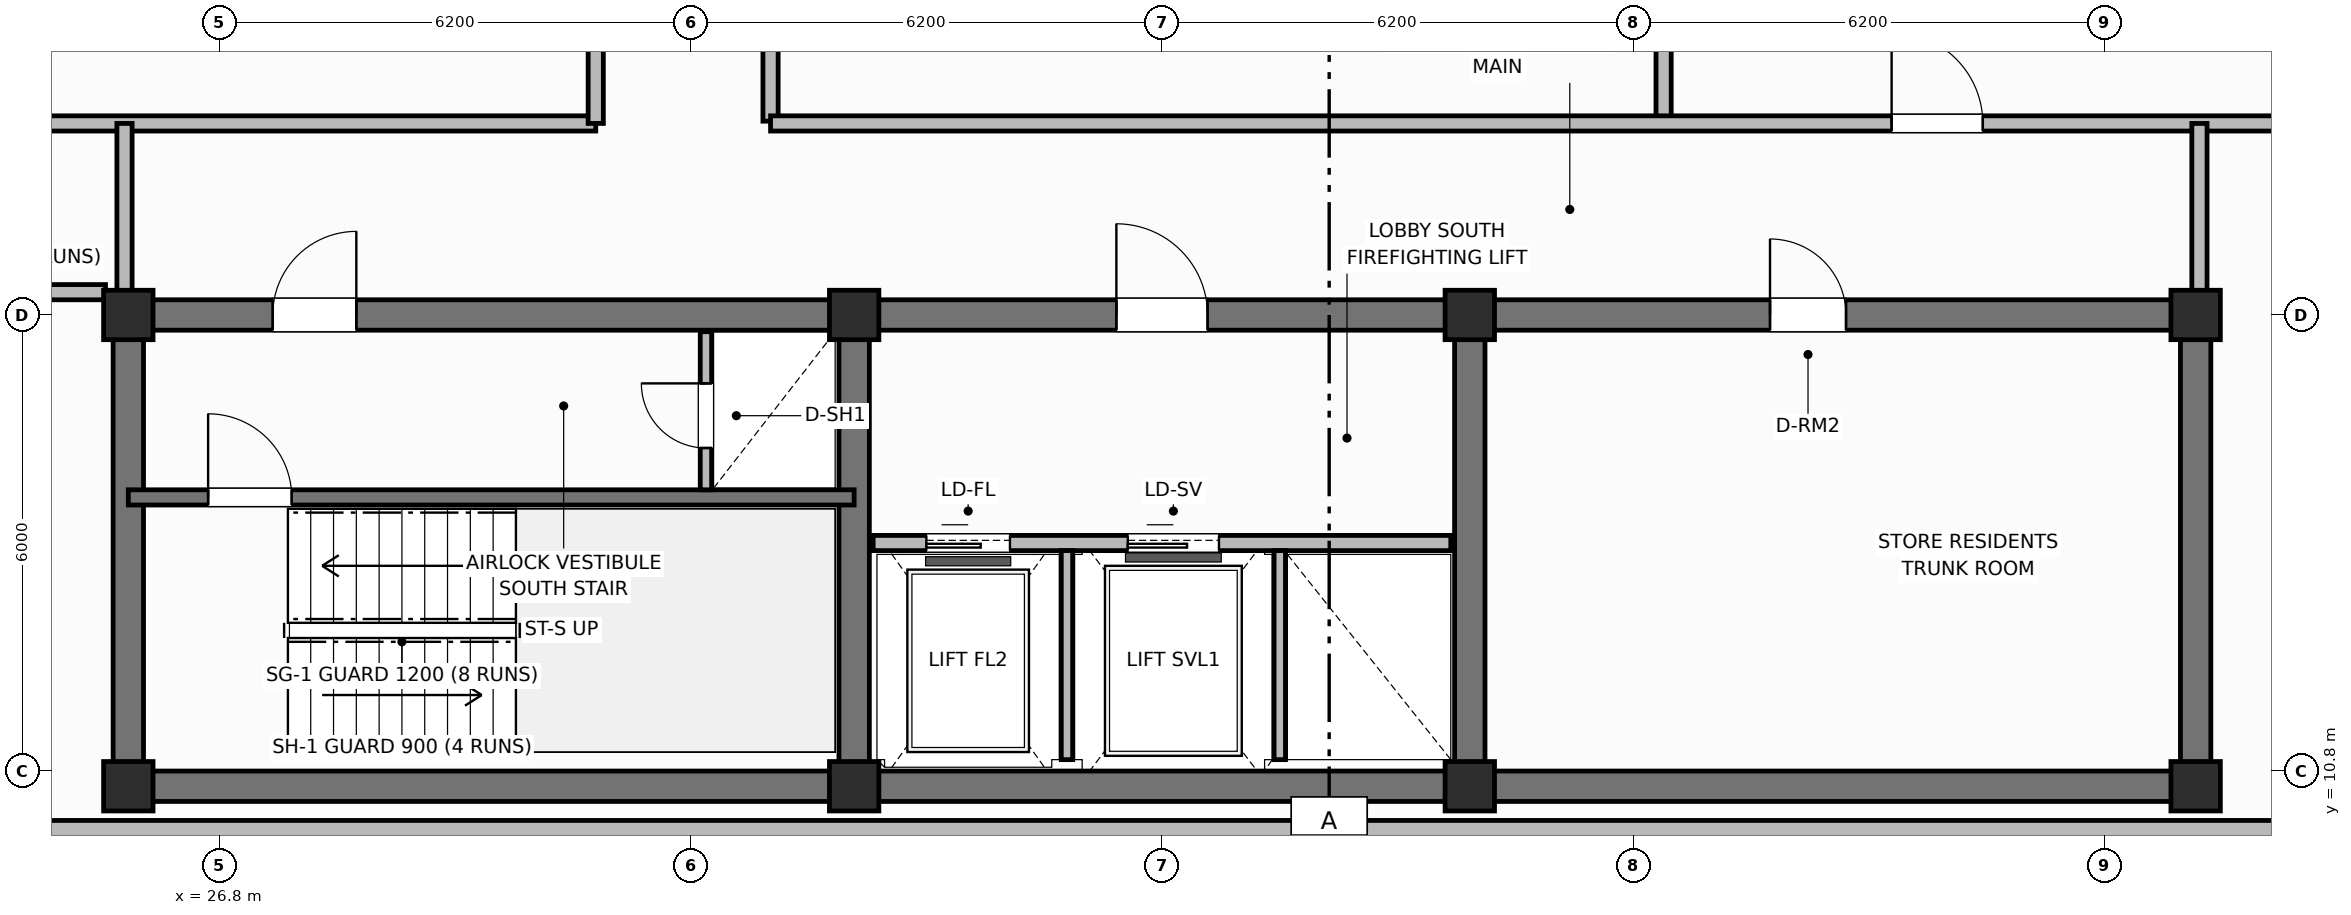
"""IFC4 building model, lengths in metres.
Left out: names, types, materials, properties, quantities, classifications, styles, units other than length and angle.
Written with IfcOpenShell. Run it as: python <this file> out.ifc"""

import sys

from ifc_helpers import new_model, si_unit, direction, frame, frame_2d, origin, origin_2d, place, context, subcontext, project, spatial, rectangle, extrude, element, fill, save


model = new_model("IFC4")
c1 = context("Model", 3, precision=1e-05, world=origin(), true_north=direction((0.0, 1.0)))
c2 = subcontext(c1, "Body", "Model", "MODEL_VIEW")
j1 = project(units=[si_unit("LENGTHUNIT", "METRE"), si_unit("PLANEANGLEUNIT", "RADIAN")], contexts=[c1])
p1 = place(None, origin())
s1 = spatial("IfcSite", under=j1, at=p1, CompositionType="ELEMENT")
p2 = place(p1, origin())
s2 = spatial("IfcBuilding", under=s1, at=p2, CompositionType="ELEMENT")
p3 = place(p2, frame((0.0, 0.0, 316.4)))
s3 = spatial("IfcBuildingStorey", under=s2, at=p3, CompositionType="ELEMENT", Elevation=316.4)
p4 = place(p3, frame((52.8, 10.6, 0.0), z_axis=(0.0, 0.0, 1.0), x_axis=(-1.0, 0.0, 0.0)))
e1 = element("IfcWall", 1, at=p4, inside=s3, PredefinedType="SHEAR", context=c2, shape_type="SweptSolid", body=[
    extrude(rectangle(XDim=27.2, YDim=0.4, at=frame_2d((13.6, 0.0))), origin(), (0.0, 0.0, 1.0), 3.6),
])
for number, where, z_axis, x_axis in (
    (2, (25.6, 10.8, 0.0), (0.0, 0.0, 1.0), (0.0, 1.0, 0.0)),
    (3, (52.8, 10.8, 0.0), (0.0, 0.0, 1.0), (0.0, 1.0, 0.0)),
):
    element("IfcWall", number, at=place(p3, frame(where, z_axis=z_axis, x_axis=x_axis)), inside=s3, PredefinedType="SHEAR", context=c2, shape_type="SweptSolid", body=[
        extrude(rectangle(XDim=5.8, YDim=0.4, at=frame_2d((2.9, 0.0))), origin(), (0.0, 0.0, 1.0), 3.6),
    ])
p5 = place(p3, frame((25.6, 16.8, 0.0), z_axis=(0.0, 0.0, 1.0), x_axis=(1.0, 0.0, 0.0)))
e4 = element("IfcWall", 4, at=p5, inside=s3, PredefinedType="SHEAR", context=c2, shape_type="SweptSolid", body=[
    extrude(rectangle(XDim=27.2, YDim=0.4, at=frame_2d((13.6, 0.0))), origin(), (0.0, 0.0, 1.0), 3.6),
])
p6 = place(p5, frame((1.9, 0.0, 0.0)))
e5 = element("IfcOpeningElement", 5, at=p6, cuts=e4, PredefinedType="OPENING", context=c2, shape_type="SweptSolid", body=[
    extrude(rectangle(XDim=1.1, YDim=2.15, at=frame_2d((0.55, 1.075))), frame((0.0, 0.21, 0.0), z_axis=(0.0, -1.0, 0.0), x_axis=(1.0, 0.0, 0.0)), (0.0, 0.0, 1.0), 0.42),
])
p7 = place(p5, frame((13.0, 0.0, 0.0)))
e6 = element("IfcOpeningElement", 6, at=p7, cuts=e4, PredefinedType="OPENING", context=c2, shape_type="SweptSolid", body=[
    extrude(rectangle(XDim=1.2, YDim=2.15, at=frame_2d((0.6, 1.075))), frame((0.0, 0.21, 0.0), z_axis=(0.0, -1.0, 0.0), x_axis=(1.0, 0.0, 0.0)), (0.0, 0.0, 1.0), 0.42),
])
p8 = place(p5, frame((21.6, 0.0, 0.0)))
e7 = element("IfcOpeningElement", 7, at=p8, cuts=e4, PredefinedType="OPENING", context=c2, shape_type="SweptSolid", body=[
    extrude(rectangle(XDim=1.0, YDim=2.15, at=frame_2d((0.5, 1.075))), frame((0.0, 0.21, 0.0), z_axis=(0.0, -1.0, 0.0), x_axis=(1.0, 0.0, 0.0)), (0.0, 0.0, 1.0), 0.42),
])
for number, where, z_axis, x_axis in (
    (8, (35.15, 10.8, 0.0), (0.0, 0.0, 1.0), (0.0, 1.0, 0.0)),
    (9, (43.25, 10.8, 0.0), (0.0, 0.0, 1.0), (0.0, 1.0, 0.0)),
):
    element("IfcWall", number, at=place(p3, frame(where, z_axis=z_axis, x_axis=x_axis)), inside=s3, PredefinedType="SHEAR", context=c2, shape_type="SweptSolid", body=[
        extrude(rectangle(XDim=5.8, YDim=0.4, at=frame_2d((2.9, 0.0))), origin(), (0.0, 0.0, 1.0), 3.6),
    ])
for number, where, z_axis, x_axis in (
    (10, (25.6, 10.6, 0.0), (0.0, 0.0, 1.0), (1.0, 0.0, 0.0)),
    (11, (25.6, 16.8, 0.0), (0.0, 0.0, 1.0), (1.0, 0.0, 0.0)),
    (12, (35.15, 10.6, 0.0), (0.0, 0.0, 1.0), (1.0, 0.0, 0.0)),
    (13, (35.15, 16.8, 0.0), (0.0, 0.0, 1.0), (1.0, 0.0, 0.0)),
    (14, (43.25, 10.6, 0.0), (0.0, 0.0, 1.0), (1.0, 0.0, 0.0)),
    (15, (43.25, 16.8, 0.0), (0.0, 0.0, 1.0), (1.0, 0.0, 0.0)),
    (16, (52.8, 10.6, 0.0), (0.0, 0.0, 1.0), (1.0, 0.0, 0.0)),
    (17, (52.8, 16.8, 0.0), (0.0, 0.0, 1.0), (1.0, 0.0, 0.0)),
):
    element("IfcColumn", number, at=place(p3, frame(where, z_axis=z_axis, x_axis=x_axis)), inside=s3, PredefinedType="COLUMN", context=c2, shape_type="SweptSolid", body=[
        extrude(rectangle(XDim=0.65, YDim=0.65, at=origin_2d()), origin(), (0.0, 0.0, 1.0), 3.6),
    ])
p9 = place(p3, frame((23.76, 10.0, 0.0), z_axis=(0.0, 0.0, 1.0), x_axis=(1.0, 0.0, 0.0)))
e18 = element("IfcWall", 18, at=p9, inside=s3, PredefinedType="SOLIDWALL", context=c2, shape_type="SweptSolid", body=[
    extrude(rectangle(XDim=30.88, YDim=0.3, at=frame_2d((15.44, 0.0))), origin(), (0.0, 0.0, 1.0), 2.84),
])
p10 = place(p3, frame((25.6, 14.4, 0.0), z_axis=(0.0, 0.0, 1.0), x_axis=(1.0, 0.0, 0.0)))
e19 = element("IfcWall", 19, at=p10, inside=s3, PredefinedType="SHEAR", context=c2, shape_type="SweptSolid", body=[
    extrude(rectangle(XDim=9.55, YDim=0.2, at=frame_2d((4.775, 0.0))), origin(), (0.0, 0.0, 1.0), 3.6),
])
p11 = place(p10, frame((1.05, 0.0, 0.0)))
e20 = element("IfcOpeningElement", 20, at=p11, cuts=e19, PredefinedType="OPENING", context=c2, shape_type="SweptSolid", body=[
    extrude(rectangle(XDim=1.1, YDim=2.15, at=frame_2d((0.55, 1.075))), frame((0.0, 0.11, 0.0), z_axis=(0.0, -1.0, 0.0), x_axis=(1.0, 0.0, 0.0)), (0.0, 0.0, 1.0), 0.22),
])
p12 = place(p3, frame((33.2, 14.5, 0.0), z_axis=(0.0, 0.0, 1.0), x_axis=(0.0, 1.0, 0.0)))
e21 = element("IfcWall", 21, at=p12, inside=s3, PredefinedType="PARTITIONING", context=c2, shape_type="SweptSolid", body=[
    extrude(rectangle(XDim=2.08, YDim=0.15, at=frame_2d((1.04, 0.0))), origin(), (0.0, 0.0, 1.0), 2.54),
])
p13 = place(p12, frame((0.55, 0.0, 0.0)))
e22 = element("IfcOpeningElement", 22, at=p13, cuts=e21, PredefinedType="OPENING", context=c2, shape_type="SweptSolid", body=[
    extrude(rectangle(XDim=0.85, YDim=2.05, at=frame_2d((0.425, 1.025))), frame((0.0, 0.085, 0.0), z_axis=(0.0, -1.0, 0.0), x_axis=(1.0, 0.0, 0.0)), (0.0, 0.0, 1.0), 0.17),
])
p14 = place(p3, frame((35.4, 13.8, 0.0), z_axis=(0.0, 0.0, 1.0), x_axis=(1.0, 0.0, 0.0)))
e23 = element("IfcWall", 23, at=p14, inside=s3, PredefinedType="PARTITIONING", context=c2, shape_type="SweptSolid", body=[
    extrude(rectangle(XDim=7.6, YDim=0.2, at=frame_2d((3.8, 0.0))), origin(), (0.0, 0.0, 1.0), 2.2),
])
p15 = place(p14, frame((0.7, 0.0, 0.0)))
e24 = element("IfcOpeningElement", 24, at=p15, cuts=e23, PredefinedType="OPENING", context=c2, shape_type="SweptSolid", body=[
    extrude(rectangle(XDim=1.1, YDim=2.15, at=frame_2d((0.55, 1.075))), frame((0.0, 0.11, 0.0), z_axis=(0.0, -1.0, 0.0), x_axis=(1.0, 0.0, 0.0)), (0.0, 0.0, 1.0), 0.22),
])
p16 = place(p14, frame((3.35, 0.0, 0.0)))
e25 = element("IfcOpeningElement", 25, at=p16, cuts=e23, PredefinedType="OPENING", context=c2, shape_type="SweptSolid", body=[
    extrude(rectangle(XDim=1.2, YDim=2.15, at=frame_2d((0.6, 1.075))), frame((0.0, 0.11, 0.0), z_axis=(0.0, -1.0, 0.0), x_axis=(1.0, 0.0, 0.0)), (0.0, 0.0, 1.0), 0.22),
])
for number, where, z_axis, x_axis in (
    (26, (37.95, 10.95, 0.0), (0.0, 0.0, 1.0), (0.0, 1.0, 0.0)),
    (27, (40.75, 10.95, 0.0), (0.0, 0.0, 1.0), (0.0, 1.0, 0.0)),
):
    element("IfcWall", number, at=place(p3, frame(where, z_axis=z_axis, x_axis=x_axis)), inside=s3, PredefinedType="PARTITIONING", context=c2, shape_type="SweptSolid", body=[
        extrude(rectangle(XDim=2.75, YDim=0.15, at=frame_2d((1.375, 0.0))), origin(), (0.0, 0.0, 1.0), 2.54),
    ])
p17 = place(p3, frame((21.53, 19.32, 0.0), z_axis=(0.0, 0.0, 1.0), x_axis=(1.0, 0.0, 0.0)))
e28 = element("IfcWall", 28, at=p17, inside=s3, PredefinedType="PARTITIONING", context=c2, shape_type="SweptSolid", body=[
    extrude(rectangle(XDim=10.22, YDim=0.2, at=frame_2d((5.11, 0.0))), origin(), (0.0, 0.0, 1.0), 2.54),
])
p18 = place(p3, frame((31.75, 19.32, 0.0), z_axis=(0.0, 0.0, 1.0), x_axis=(0.0, 1.0, 0.0)))
e29 = element("IfcWall", 29, at=p18, inside=s3, PredefinedType="PARTITIONING", context=c2, shape_type="SweptSolid", body=[
    extrude(rectangle(XDim=17.76, YDim=0.2, at=frame_2d((8.88, 0.0))), origin(), (0.0, 0.0, 1.0), 2.54),
])
p19 = place(p18, frame((6.0, 0.0, 0.0)))
e30 = element("IfcOpeningElement", 30, at=p19, cuts=e29, PredefinedType="OPENING", context=c2, shape_type="SweptSolid", body=[
    extrude(rectangle(XDim=1.2, YDim=2.15, at=frame_2d((0.6, 1.075))), frame((0.0, 0.11, 0.0), z_axis=(0.0, -1.0, 0.0), x_axis=(1.0, 0.0, 0.0)), (0.0, 0.0, 1.0), 0.22),
])
p20 = place(p3, frame((34.05, 19.35, 0.0), z_axis=(0.0, 0.0, 1.0), x_axis=(0.0, 1.0, 0.0)))
e31 = element("IfcWall", 31, at=p20, inside=s3, PredefinedType="PARTITIONING", context=c2, shape_type="SweptSolid", body=[
    extrude(rectangle(XDim=17.7, YDim=0.2, at=frame_2d((8.85, 0.0))), origin(), (0.0, 0.0, 1.0), 2.54),
])
p21 = place(p20, frame((6.0, 0.0, 0.0)))
e32 = element("IfcOpeningElement", 32, at=p21, cuts=e31, PredefinedType="OPENING", context=c2, shape_type="SweptSolid", body=[
    extrude(rectangle(XDim=1.2, YDim=2.15, at=frame_2d((0.6, 1.075))), frame((0.0, 0.11, 0.0), z_axis=(0.0, -1.0, 0.0), x_axis=(1.0, 0.0, 0.0)), (0.0, 0.0, 1.0), 0.22),
])
p22 = place(p3, frame((45.8, 19.35, 0.0), z_axis=(0.0, 0.0, 1.0), x_axis=(0.0, 1.0, 0.0)))
e33 = element("IfcWall", 33, at=p22, inside=s3, PredefinedType="PARTITIONING", context=c2, shape_type="SweptSolid", body=[
    extrude(rectangle(XDim=17.7, YDim=0.2, at=frame_2d((8.85, 0.0))), origin(), (0.0, 0.0, 1.0), 2.54),
])
p23 = place(p3, frame((34.05, 19.32, 0.0), z_axis=(0.0, 0.0, 1.0), x_axis=(1.0, 0.0, 0.0)))
e34 = element("IfcWall", 34, at=p23, inside=s3, PredefinedType="PARTITIONING", context=c2, shape_type="SweptSolid", body=[
    extrude(rectangle(XDim=22.82, YDim=0.2, at=frame_2d((11.41, 0.0))), origin(), (0.0, 0.0, 1.0), 2.54),
])
p24 = place(p23, frame((14.75, 0.0, 0.0)))
e35 = element("IfcOpeningElement", 35, at=p24, cuts=e34, PredefinedType="OPENING", context=c2, shape_type="SweptSolid", body=[
    extrude(rectangle(XDim=1.2, YDim=2.15, at=frame_2d((0.6, 1.075))), frame((0.0, 0.11, 0.0), z_axis=(0.0, -1.0, 0.0), x_axis=(1.0, 0.0, 0.0)), (0.0, 0.0, 1.0), 0.22),
])
for number, where, z_axis, x_axis in (
    (36, (52.85, 16.95, 0.0), (0.0, 0.0, 1.0), (0.0, 1.0, 0.0)),
    (37, (25.55, 16.95, 0.0), (0.0, 0.0, 1.0), (0.0, 1.0, 0.0)),
):
    element("IfcWall", number, at=place(p3, frame(where, z_axis=z_axis, x_axis=x_axis)), inside=s3, PredefinedType="PARTITIONING", context=c2, shape_type="SweptSolid", body=[
        extrude(rectangle(XDim=2.37, YDim=0.2, at=frame_2d((1.185, 0.0))), origin(), (0.0, 0.0, 1.0), 2.54),
    ])
p25 = place(p3, frame((21.53, 17.1, 0.0), z_axis=(0.0, 0.0, 1.0), x_axis=(1.0, 0.0, 0.0)))
e38 = element("IfcWall", 38, at=p25, inside=s3, PredefinedType="PARTITIONING", context=c2, shape_type="SweptSolid", body=[
    extrude(rectangle(XDim=3.77, YDim=0.2, at=frame_2d((1.885, 0.0))), origin(), (0.0, 0.0, 1.0), 2.54),
])
p26 = place(p11, origin())
e39 = element("IfcDoor", 39, at=p26, inside=s3, OperationType="SINGLE_SWING_LEFT", PredefinedType="DOOR", context=c2, shape_type="SweptSolid", body=[
    extrude(rectangle(XDim=1.1, YDim=2.15, at=frame_2d((0.55, 1.075))), frame((0.0, 0.025, 0.0), z_axis=(0.0, -1.0, 0.0), x_axis=(1.0, 0.0, 0.0)), (0.0, 0.0, 1.0), 0.05),
])
fill(e20, e39)
p27 = place(p13, origin())
e40 = element("IfcDoor", 40, at=p27, inside=s3, OperationType="SINGLE_SWING_RIGHT", PredefinedType="TRAPDOOR", context=c2, shape_type="SweptSolid", body=[
    extrude(rectangle(XDim=0.85, YDim=2.05, at=frame_2d((0.425, 1.025))), frame((0.0, 0.025, 0.0), z_axis=(0.0, -1.0, 0.0), x_axis=(1.0, 0.0, 0.0)), (0.0, 0.0, 1.0), 0.05),
])
fill(e22, e40)
p28 = place(p15, origin())
e41 = element("IfcDoor", 41, at=p28, inside=s3, OperationType="SLIDING_TO_LEFT", PredefinedType="DOOR", context=c2, shape_type="SweptSolid", body=[
    extrude(rectangle(XDim=1.1, YDim=2.15, at=frame_2d((0.55, 1.075))), frame((0.0, 0.025, 0.0), z_axis=(0.0, -1.0, 0.0), x_axis=(1.0, 0.0, 0.0)), (0.0, 0.0, 1.0), 0.05),
])
fill(e24, e41)
p29 = place(p16, origin())
e42 = element("IfcDoor", 42, at=p29, inside=s3, OperationType="SLIDING_TO_LEFT", PredefinedType="DOOR", context=c2, shape_type="SweptSolid", body=[
    extrude(rectangle(XDim=1.2, YDim=2.15, at=frame_2d((0.6, 1.075))), frame((0.0, 0.025, 0.0), z_axis=(0.0, -1.0, 0.0), x_axis=(1.0, 0.0, 0.0)), (0.0, 0.0, 1.0), 0.05),
])
fill(e25, e42)
p30 = place(p24, origin())
e43 = element("IfcDoor", 43, at=p30, inside=s3, OperationType="SINGLE_SWING_LEFT", PredefinedType="DOOR", context=c2, shape_type="SweptSolid", body=[
    extrude(rectangle(XDim=1.2, YDim=2.15, at=frame_2d((0.6, 1.075))), frame((0.0, 0.025, 0.0), z_axis=(0.0, -1.0, 0.0), x_axis=(1.0, 0.0, 0.0)), (0.0, 0.0, 1.0), 0.05),
])
fill(e35, e43)
p31 = place(p6, origin())
e44 = element("IfcDoor", 44, at=p31, inside=s3, OperationType="SINGLE_SWING_RIGHT", PredefinedType="DOOR", context=c2, shape_type="SweptSolid", body=[
    extrude(rectangle(XDim=1.1, YDim=2.15, at=frame_2d((0.55, 1.075))), frame((0.0, 0.025, 0.0), z_axis=(0.0, -1.0, 0.0), x_axis=(1.0, 0.0, 0.0)), (0.0, 0.0, 1.0), 0.05),
])
fill(e5, e44)
p32 = place(p7, origin())
e45 = element("IfcDoor", 45, at=p32, inside=s3, OperationType="SINGLE_SWING_LEFT", PredefinedType="DOOR", context=c2, shape_type="SweptSolid", body=[
    extrude(rectangle(XDim=1.2, YDim=2.15, at=frame_2d((0.6, 1.075))), frame((0.0, 0.025, 0.0), z_axis=(0.0, -1.0, 0.0), x_axis=(1.0, 0.0, 0.0)), (0.0, 0.0, 1.0), 0.05),
])
fill(e6, e45)
p33 = place(p8, origin())
e46 = element("IfcDoor", 46, at=p33, inside=s3, OperationType="SINGLE_SWING_LEFT", PredefinedType="DOOR", context=c2, shape_type="SweptSolid", body=[
    extrude(rectangle(XDim=1.0, YDim=2.15, at=frame_2d((0.5, 1.075))), frame((0.0, 0.025, 0.0), z_axis=(0.0, -1.0, 0.0), x_axis=(1.0, 0.0, 0.0)), (0.0, 0.0, 1.0), 0.05),
])
fill(e7, e46)
save(model, sys.argv[1])
